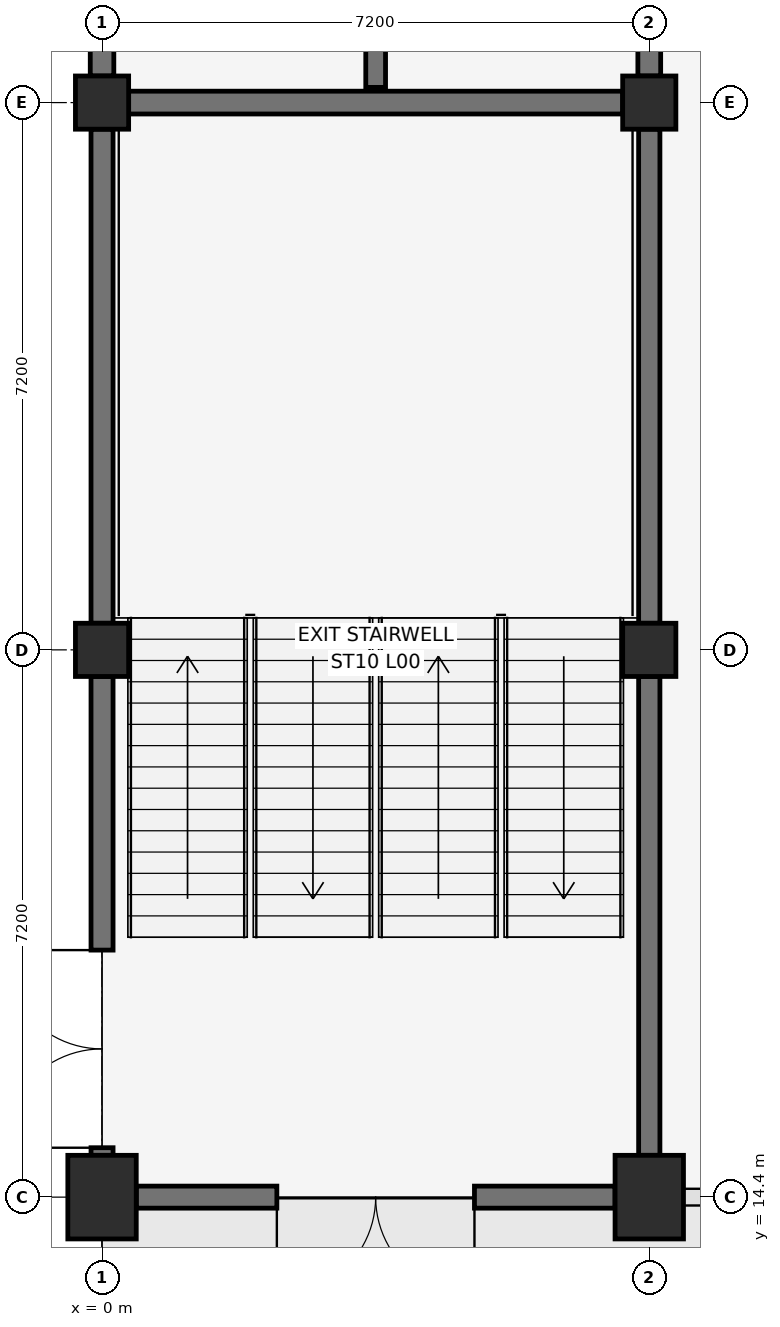
"""IFC4 building model, lengths in metres.
Left out: names, types, materials, properties, quantities, classifications, styles, units other than length and angle.
Written with IfcOpenShell. Run it as: python <this file> out.ifc"""

import sys

from ifc_helpers import new_model, si_unit, direction, frame, frame_2d, origin, origin_2d, place, context, subcontext, project, spatial, rectangle, extrude, element, fill, save


model = new_model("IFC4")
c1 = context("Model", 3, precision=1e-05, world=origin(), true_north=direction((0.0, 1.0)))
c2 = subcontext(c1, "Body", "Model", "MODEL_VIEW")
j1 = project(units=[si_unit("LENGTHUNIT", "METRE"), si_unit("PLANEANGLEUNIT", "RADIAN")], contexts=[c1])
p1 = place(None, origin())
s1 = spatial("IfcSite", under=j1, at=p1, CompositionType="ELEMENT")
p2 = place(p1, origin())
s2 = spatial("IfcBuilding", under=s1, at=p2, CompositionType="ELEMENT")
p3 = place(p2, origin())
s3 = spatial("IfcBuildingStorey", under=s2, at=p3, CompositionType="ELEMENT", Elevation=0.0)
p4 = place(p3, frame((0.0, 14.4, 0.0), z_axis=(0.0, 0.0, 1.0), x_axis=(1.0, 0.0, 0.0)))
e1 = element("IfcColumn", 1, at=p4, inside=s3, PredefinedType="COLUMN", context=c2, shape_type="SweptSolid", body=[
    extrude(rectangle(XDim=0.9, YDim=1.1, at=origin_2d()), origin(), (0.0, 0.0, 1.0), 5.4),
])
for number, where, z_axis, x_axis in (
    (2, (0.0, 21.6, 0.0), (0.0, 0.0, 1.0), (1.0, 0.0, 0.0)),
    (3, (0.0, 28.8, 0.0), (0.0, 0.0, 1.0), (1.0, 0.0, 0.0)),
):
    element("IfcColumn", number, at=place(p3, frame(where, z_axis=z_axis, x_axis=x_axis)), inside=s3, PredefinedType="COLUMN", context=c2, shape_type="SweptSolid", body=[
        extrude(rectangle(XDim=0.7, YDim=0.7, at=origin_2d()), origin(), (0.0, 0.0, 1.0), 5.4),
    ])
p5 = place(p3, frame((7.2, 14.4, 0.0), z_axis=(0.0, 0.0, 1.0), x_axis=(1.0, 0.0, 0.0)))
e4 = element("IfcColumn", 4, at=p5, inside=s3, PredefinedType="COLUMN", context=c2, shape_type="SweptSolid", body=[
    extrude(rectangle(XDim=0.9, YDim=1.1, at=origin_2d()), origin(), (0.0, 0.0, 1.0), 5.4),
])
for number, where, z_axis, x_axis in (
    (5, (7.2, 21.6, 0.0), (0.0, 0.0, 1.0), (1.0, 0.0, 0.0)),
    (6, (7.2, 28.8, 0.0), (0.0, 0.0, 1.0), (1.0, 0.0, 0.0)),
):
    element("IfcColumn", number, at=place(p3, frame(where, z_axis=z_axis, x_axis=x_axis)), inside=s3, PredefinedType="COLUMN", context=c2, shape_type="SweptSolid", body=[
        extrude(rectangle(XDim=0.7, YDim=0.7, at=origin_2d()), origin(), (0.0, 0.0, 1.0), 5.4),
    ])
p6 = place(p3, frame((0.35, 28.8, 0.0), z_axis=(0.0, 0.0, 1.0), x_axis=(1.0, 0.0, 0.0)))
e7 = element("IfcWall", 7, at=p6, inside=s3, PredefinedType="SHEAR", context=c2, shape_type="SweptSolid", body=[
    extrude(rectangle(XDim=6.5, YDim=0.3, at=frame_2d((3.25, 0.0))), origin(), (0.0, 0.0, 1.0), 5.14),
])
p7 = place(p3, frame((0.0, 29.15, 0.0), z_axis=(0.0, 0.0, 1.0), x_axis=(0.0, 1.0, 0.0)))
e8 = element("IfcWall", 8, at=p7, inside=s3, PredefinedType="SHEAR", context=c2, shape_type="SweptSolid", body=[
    extrude(rectangle(XDim=6.5, YDim=0.31, at=frame_2d((3.25, 0.0))), origin(), (0.0, 0.0, 1.0), 5.14),
])
p8 = place(p7, frame((1.45, 0.0, 0.0)))
e9 = element("IfcOpeningElement", 9, at=p8, cuts=e8, PredefinedType="OPENING", context=c2, shape_type="SweptSolid", body=[
    extrude(rectangle(XDim=1.7, YDim=2.3, at=frame_2d((0.85, 1.15))), frame((0.0, 0.17, 0.0), z_axis=(0.0, -1.0, 0.0), x_axis=(1.0, 0.0, 0.0)), (0.0, 0.0, 1.0), 0.34),
])
p9 = place(p3, frame((7.2, 29.15, 0.0), z_axis=(0.0, 0.0, 1.0), x_axis=(0.0, 1.0, 0.0)))
e10 = element("IfcWall", 10, at=p9, inside=s3, PredefinedType="SHEAR", context=c2, shape_type="SweptSolid", body=[
    extrude(rectangle(XDim=6.5, YDim=0.3, at=frame_2d((3.25, 0.0))), origin(), (0.0, 0.0, 1.0), 5.14),
])
p10 = place(p3, frame((3.6, 29.0, 0.0), z_axis=(0.0, 0.0, 1.0), x_axis=(0.0, 1.0, 0.0)))
e11 = element("IfcWall", 11, at=p10, inside=s3, PredefinedType="SHEAR", context=c2, shape_type="SweptSolid", body=[
    extrude(rectangle(XDim=14.0, YDim=0.26, at=frame_2d((7.0, 0.0))), origin(), (0.0, 0.0, 1.0), 5.14),
])
p11 = place(p10, frame((1.65, 0.0, 0.0)))
e12 = element("IfcOpeningElement", 12, at=p11, cuts=e11, PredefinedType="OPENING", context=c2, shape_type="SweptSolid", body=[
    extrude(rectangle(XDim=1.1, YDim=2.15, at=frame_2d((0.55, 1.075))), frame((0.0, 0.145, 0.0), z_axis=(0.0, -1.0, 0.0), x_axis=(1.0, 0.0, 0.0)), (0.0, 0.0, 1.0), 0.29),
])
p12 = place(p10, frame((10.6, 0.0, 0.0)))
e13 = element("IfcOpeningElement", 13, at=p12, cuts=e11, PredefinedType="OPENING", context=c2, shape_type="SweptSolid", body=[
    extrude(rectangle(XDim=1.1, YDim=2.2, at=frame_2d((0.55, 1.1))), frame((0.0, 0.145, 0.0), z_axis=(0.0, -1.0, 0.0), x_axis=(1.0, 0.0, 0.0)), (0.0, 0.0, 1.0), 0.29),
])
p13 = place(p3, frame((0.45, 14.4, 0.0), z_axis=(0.0, 0.0, 1.0), x_axis=(1.0, 0.0, 0.0)))
e14 = element("IfcWall", 14, at=p13, inside=s3, PredefinedType="SHEAR", context=c2, shape_type="SweptSolid", body=[
    extrude(rectangle(XDim=6.3, YDim=0.29, at=frame_2d((3.15, 0.0))), origin(), (0.0, 0.0, 1.0), 5.14),
])
p14 = place(p13, frame((1.85, 0.0, 0.0)))
e15 = element("IfcOpeningElement", 15, at=p14, cuts=e14, PredefinedType="OPENING", context=c2, shape_type="SweptSolid", body=[
    extrude(rectangle(XDim=2.6, YDim=2.4, at=frame_2d((1.3, 1.2))), frame((0.0, 0.16, 0.0), z_axis=(0.0, -1.0, 0.0), x_axis=(1.0, 0.0, 0.0)), (0.0, 0.0, 1.0), 0.32),
])
p15 = place(p3, frame((0.0, 14.95, 0.0), z_axis=(0.0, 0.0, 1.0), x_axis=(0.0, 1.0, 0.0)))
e16 = element("IfcWall", 16, at=p15, inside=s3, PredefinedType="SHEAR", context=c2, shape_type="SweptSolid", body=[
    extrude(rectangle(XDim=6.3, YDim=0.29, at=frame_2d((3.15, 0.0))), origin(), (0.0, 0.0, 1.0), 5.14),
])
p16 = place(p15, frame((0.1, 0.0, 0.0)))
e17 = element("IfcOpeningElement", 17, at=p16, cuts=e16, PredefinedType="OPENING", context=c2, shape_type="SweptSolid", body=[
    extrude(rectangle(XDim=2.6, YDim=2.4, at=frame_2d((1.3, 1.2))), frame((0.0, 0.16, 0.0), z_axis=(0.0, -1.0, 0.0), x_axis=(1.0, 0.0, 0.0)), (0.0, 0.0, 1.0), 0.32),
])
p17 = place(p3, frame((0.0, 21.95, 0.0), z_axis=(0.0, 0.0, 1.0), x_axis=(0.0, 1.0, 0.0)))
e18 = element("IfcWall", 18, at=p17, inside=s3, PredefinedType="SHEAR", context=c2, shape_type="SweptSolid", body=[
    extrude(rectangle(XDim=6.5, YDim=0.29, at=frame_2d((3.25, 0.0))), origin(), (0.0, 0.0, 1.0), 5.14),
])
p18 = place(p3, frame((7.2, 14.95, 0.0), z_axis=(0.0, 0.0, 1.0), x_axis=(0.0, 1.0, 0.0)))
e19 = element("IfcWall", 19, at=p18, inside=s3, PredefinedType="SHEAR", context=c2, shape_type="SweptSolid", body=[
    extrude(rectangle(XDim=6.3, YDim=0.28, at=frame_2d((3.15, 0.0))), origin(), (0.0, 0.0, 1.0), 5.14),
])
p19 = place(p3, frame((7.2, 21.95, 0.0), z_axis=(0.0, 0.0, 1.0), x_axis=(0.0, 1.0, 0.0)))
e20 = element("IfcWall", 20, at=p19, inside=s3, PredefinedType="SHEAR", context=c2, shape_type="SweptSolid", body=[
    extrude(rectangle(XDim=6.5, YDim=0.28, at=frame_2d((3.25, 0.0))), origin(), (0.0, 0.0, 1.0), 5.14),
])
p20 = place(p16, origin())
e21 = element("IfcDoor", 21, at=p20, inside=s3, OperationType="DOUBLE_SWING_LEFT", PredefinedType="DOOR", context=c2, shape_type="SweptSolid", body=[
    extrude(rectangle(XDim=2.6, YDim=2.4, at=frame_2d((1.3, 1.2))), frame((0.0, 0.025, 0.0), z_axis=(0.0, -1.0, 0.0), x_axis=(1.0, 0.0, 0.0)), (0.0, 0.0, 1.0), 0.05),
])
fill(e17, e21)
p21 = place(p14, frame((2.6, 0.0, 0.0), z_axis=(0.0, 0.0, 1.0), x_axis=(-1.0, 0.0, 0.0)))
e22 = element("IfcDoor", 22, at=p21, inside=s3, OperationType="DOUBLE_SWING_LEFT", PredefinedType="DOOR", context=c2, shape_type="SweptSolid", body=[
    extrude(rectangle(XDim=2.6, YDim=2.4, at=frame_2d((1.3, 1.2))), frame((0.0, 0.025, 0.0), z_axis=(0.0, -1.0, 0.0), x_axis=(1.0, 0.0, 0.0)), (0.0, 0.0, 1.0), 0.05),
])
fill(e15, e22)
save(model, sys.argv[1])
